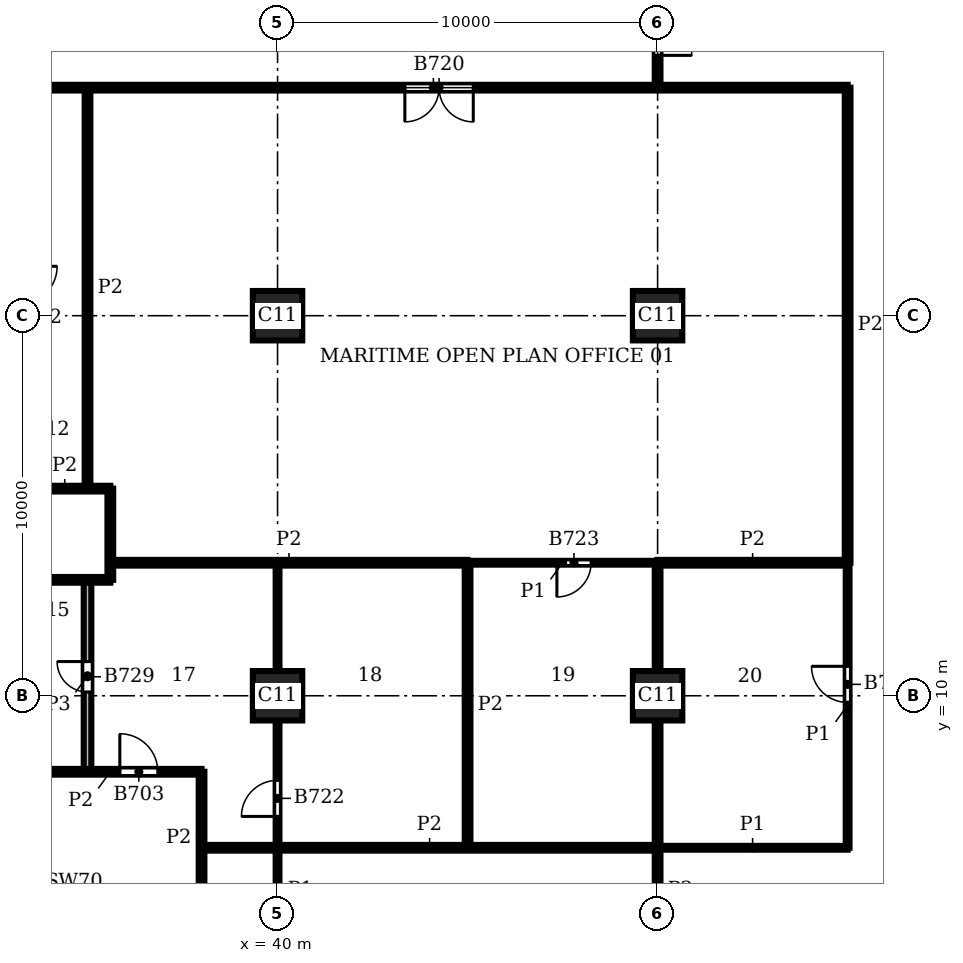
"""IFC4 building model, lengths in metres.
Left out: names, types, materials, properties, quantities, classifications, styles, units other than length and angle.
Written with IfcOpenShell. Run it as: python <this file> out.ifc"""

import sys

from ifc_helpers import new_model, si_unit, direction, frame, frame_2d, origin, origin_2d, place, context, subcontext, project, spatial, rectangle, extrude, element, fill, save


model = new_model("IFC4")
c1 = context("Model", 3, precision=1e-05, world=origin(), true_north=direction((0.0, 1.0)))
c2 = subcontext(c1, "Body", "Model", "MODEL_VIEW")
j1 = project(units=[si_unit("LENGTHUNIT", "METRE"), si_unit("PLANEANGLEUNIT", "RADIAN")], contexts=[c1])
p1 = place(None, origin())
s1 = spatial("IfcSite", under=j1, at=p1, CompositionType="ELEMENT")
p2 = place(p1, origin())
s2 = spatial("IfcBuilding", under=s1, at=p2, CompositionType="ELEMENT")
p3 = place(p2, frame((0.0, 0.0, 205.8)))
s3 = spatial("IfcBuildingStorey", under=s2, at=p3, CompositionType="ELEMENT", Elevation=205.8)
for number, where, z_axis, x_axis in (
    (1, (40.0, 10.0, 0.0), (0.0, 0.0, 1.0), (1.0, 0.0, 0.0)),
    (2, (40.0, 20.0, 0.0), (0.0, 0.0, 1.0), (1.0, 0.0, 0.0)),
    (3, (50.0, 10.0, 0.0), (0.0, 0.0, 1.0), (1.0, 0.0, 0.0)),
    (4, (50.0, 20.0, 0.0), (0.0, 0.0, 1.0), (1.0, 0.0, 0.0)),
):
    element("IfcColumn", number, at=place(p3, frame(where, z_axis=z_axis, x_axis=x_axis)), inside=s3, PredefinedType="COLUMN", context=c2, shape_type="SweptSolid", body=[
        extrude(rectangle(XDim=1.3, YDim=1.3, at=origin_2d()), origin(), (0.0, 0.0, 1.0), 3.9),
    ])
p4 = place(p3, frame((40.0, 0.45, 0.0), z_axis=(0.0, 0.0, 1.0), x_axis=(0.0, 1.0, 0.0)))
e5 = element("IfcWall", 5, at=p4, inside=s3, PredefinedType="PARTITIONING", context=c2, shape_type="SweptSolid", body=[
    extrude(rectangle(XDim=8.9, YDim=0.1, at=frame_2d((4.45, 0.0))), origin(), (0.0, 0.0, 1.0), 3.58),
])
p5 = place(p4, frame((6.375, 0.0, 0.0)))
e6 = element("IfcOpeningElement", 6, at=p5, cuts=e5, PredefinedType="OPENING", context=c2, shape_type="SweptSolid", body=[
    extrude(rectangle(XDim=0.95, YDim=2.1, at=frame_2d((0.475, 1.05))), frame((0.0, 0.06, 0.0), z_axis=(0.0, -1.0, 0.0), x_axis=(1.0, 0.0, 0.0)), (0.0, 0.0, 1.0), 0.12),
])
p6 = place(p4, frame((3.0, 0.0, 0.0)))
e7 = element("IfcOpeningElement", 7, at=p6, cuts=e5, PredefinedType="OPENING", context=c2, shape_type="SweptSolid", body=[
    extrude(rectangle(XDim=0.9, YDim=2.1, at=frame_2d((0.45, 1.05))), frame((0.0, 0.06, 0.0), z_axis=(0.0, -1.0, 0.0), x_axis=(1.0, 0.0, 0.0)), (0.0, 0.0, 1.0), 0.12),
])
p7 = place(p3, frame((40.0, 10.65, 0.0), z_axis=(0.0, 0.0, 1.0), x_axis=(0.0, 1.0, 0.0)))
e8 = element("IfcWall", 8, at=p7, inside=s3, PredefinedType="PARTITIONING", context=c2, shape_type="SweptSolid", body=[
    extrude(rectangle(XDim=2.85, YDim=0.1, at=frame_2d((1.425, 0.0))), origin(), (0.0, 0.0, 1.0), 3.58),
])
p8 = place(p3, frame((55.0, 6.0, 0.0), z_axis=(0.0, 0.0, 1.0), x_axis=(0.0, 1.0, 0.0)))
e9 = element("IfcWall", 9, at=p8, inside=s3, PredefinedType="PARTITIONING", context=c2, shape_type="SweptSolid", body=[
    extrude(rectangle(XDim=7.5, YDim=0.1, at=frame_2d((3.75, 0.0))), origin(), (0.0, 0.0, 1.0), 3.58),
])
p9 = place(p8, frame((3.825, 0.0, 0.0)))
e10 = element("IfcOpeningElement", 10, at=p9, cuts=e9, PredefinedType="OPENING", context=c2, shape_type="SweptSolid", body=[
    extrude(rectangle(XDim=0.95, YDim=2.1, at=frame_2d((0.475, 1.05))), frame((0.0, 0.06, 0.0), z_axis=(0.0, -1.0, 0.0), x_axis=(1.0, 0.0, 0.0)), (0.0, 0.0, 1.0), 0.12),
])
p10 = place(p3, frame((50.0, 6.0, 0.0), z_axis=(0.0, 0.0, 1.0), x_axis=(1.0, 0.0, 0.0)))
e11 = element("IfcWall", 11, at=p10, inside=s3, PredefinedType="PARTITIONING", context=c2, shape_type="SweptSolid", body=[
    extrude(rectangle(XDim=5.0, YDim=0.1, at=frame_2d((2.5, 0.0))), origin(), (0.0, 0.0, 1.0), 3.58),
])
p11 = place(p3, frame((45.0, 13.5, 0.0), z_axis=(0.0, 0.0, 1.0), x_axis=(1.0, 0.0, 0.0)))
e12 = element("IfcWall", 12, at=p11, inside=s3, PredefinedType="PARTITIONING", context=c2, shape_type="SweptSolid", body=[
    extrude(rectangle(XDim=5.0, YDim=0.1, at=frame_2d((2.5, 0.0))), origin(), (0.0, 0.0, 1.0), 3.58),
])
p12 = place(p11, frame((2.35, 0.0, 0.0)))
e13 = element("IfcOpeningElement", 13, at=p12, cuts=e12, PredefinedType="OPENING", context=c2, shape_type="SweptSolid", body=[
    extrude(rectangle(XDim=0.9, YDim=2.1, at=frame_2d((0.45, 1.05))), frame((0.0, 0.06, 0.0), z_axis=(0.0, -1.0, 0.0), x_axis=(1.0, 0.0, 0.0)), (0.0, 0.0, 1.0), 0.12),
])
p13 = place(p3, frame((35.0, 15.45, 0.0), z_axis=(0.0, 0.0, 1.0), x_axis=(0.0, 1.0, 0.0)))
e14 = element("IfcWall", 14, at=p13, inside=s3, PredefinedType="PARTITIONING", context=c2, shape_type="SweptSolid", body=[
    extrude(rectangle(XDim=10.55, YDim=0.15, at=frame_2d((5.275, 0.0))), origin(), (0.0, 0.0, 1.0), 3.58),
])
p14 = place(p3, frame((35.6, 13.05, 0.0), z_axis=(0.0, 0.0, 1.0), x_axis=(0.0, 1.0, 0.0)))
e15 = element("IfcWall", 15, at=p14, inside=s3, PredefinedType="PARTITIONING", context=c2, shape_type="SweptSolid", body=[
    extrude(rectangle(XDim=2.4, YDim=0.15, at=frame_2d((1.2, 0.0))), origin(), (0.0, 0.0, 1.0), 3.58),
])
p15 = place(p3, frame((38.0, 4.5, 0.0), z_axis=(0.0, 0.0, 1.0), x_axis=(0.0, 1.0, 0.0)))
e16 = element("IfcWall", 16, at=p15, inside=s3, PredefinedType="PARTITIONING", context=c2, shape_type="SweptSolid", body=[
    extrude(rectangle(XDim=3.5, YDim=0.15, at=frame_2d((1.75, 0.0))), origin(), (0.0, 0.0, 1.0), 3.58),
])
p16 = place(p3, frame((45.0, 6.0, 0.0), z_axis=(0.0, 0.0, 1.0), x_axis=(0.0, 1.0, 0.0)))
e17 = element("IfcWall", 17, at=p16, inside=s3, PredefinedType="PARTITIONING", context=c2, shape_type="SweptSolid", body=[
    extrude(rectangle(XDim=7.5, YDim=0.15, at=frame_2d((3.75, 0.0))), origin(), (0.0, 0.0, 1.0), 3.58),
])
p17 = place(p3, frame((50.0, 0.45, 0.0), z_axis=(0.0, 0.0, 1.0), x_axis=(0.0, 1.0, 0.0)))
e18 = element("IfcWall", 18, at=p17, inside=s3, PredefinedType="PARTITIONING", context=c2, shape_type="SweptSolid", body=[
    extrude(rectangle(XDim=8.9, YDim=0.15, at=frame_2d((4.45, 0.0))), origin(), (0.0, 0.0, 1.0), 3.58),
])
p18 = place(p3, frame((50.0, 10.65, 0.0), z_axis=(0.0, 0.0, 1.0), x_axis=(0.0, 1.0, 0.0)))
e19 = element("IfcWall", 19, at=p18, inside=s3, PredefinedType="PARTITIONING", context=c2, shape_type="SweptSolid", body=[
    extrude(rectangle(XDim=2.85, YDim=0.15, at=frame_2d((1.425, 0.0))), origin(), (0.0, 0.0, 1.0), 3.58),
])
p19 = place(p3, frame((50.0, 26.0, 0.0), z_axis=(0.0, 0.0, 1.0), x_axis=(0.0, 1.0, 0.0)))
e20 = element("IfcWall", 20, at=p19, inside=s3, PredefinedType="PARTITIONING", context=c2, shape_type="SweptSolid", body=[
    extrude(rectangle(XDim=3.55, YDim=0.15, at=frame_2d((1.775, 0.0))), origin(), (0.0, 0.0, 1.0), 3.58),
])
p20 = place(p19, frame((0.85, 0.0, 0.0)))
e21 = element("IfcOpeningElement", 21, at=p20, cuts=e20, PredefinedType="OPENING", context=c2, shape_type="SweptSolid", body=[
    extrude(rectangle(XDim=1.8, YDim=2.1, at=frame_2d((0.9, 1.05))), frame((0.0, 0.085, 0.0), z_axis=(0.0, -1.0, 0.0), x_axis=(1.0, 0.0, 0.0)), (0.0, 0.0, 1.0), 0.17),
])
p21 = place(p3, frame((55.0, 13.5, 0.0), z_axis=(0.0, 0.0, 1.0), x_axis=(0.0, 1.0, 0.0)))
e22 = element("IfcWall", 22, at=p21, inside=s3, PredefinedType="PARTITIONING", context=c2, shape_type="SweptSolid", body=[
    extrude(rectangle(XDim=12.5, YDim=0.15, at=frame_2d((6.25, 0.0))), origin(), (0.0, 0.0, 1.0), 3.58),
])
p22 = place(p3, frame((38.0, 6.0, 0.0), z_axis=(0.0, 0.0, 1.0), x_axis=(1.0, 0.0, 0.0)))
e23 = element("IfcWall", 23, at=p22, inside=s3, PredefinedType="PARTITIONING", context=c2, shape_type="SweptSolid", body=[
    extrude(rectangle(XDim=12.0, YDim=0.15, at=frame_2d((6.0, 0.0))), origin(), (0.0, 0.0, 1.0), 3.58),
])
p23 = place(p3, frame((33.2, 8.0, 0.0), z_axis=(0.0, 0.0, 1.0), x_axis=(1.0, 0.0, 0.0)))
e24 = element("IfcWall", 24, at=p23, inside=s3, PredefinedType="PARTITIONING", context=c2, shape_type="SweptSolid", body=[
    extrude(rectangle(XDim=4.8, YDim=0.15, at=frame_2d((2.4, 0.0))), origin(), (0.0, 0.0, 1.0), 3.58),
])
p24 = place(p23, frame((2.65, 0.0, 0.0)))
e25 = element("IfcOpeningElement", 25, at=p24, cuts=e24, PredefinedType="OPENING", context=c2, shape_type="SweptSolid", body=[
    extrude(rectangle(XDim=1.0, YDim=2.1, at=frame_2d((0.5, 1.05))), frame((0.0, 0.085, 0.0), z_axis=(0.0, -1.0, 0.0), x_axis=(1.0, 0.0, 0.0)), (0.0, 0.0, 1.0), 0.17),
])
p25 = place(p3, frame((33.2, 13.05, 0.0), z_axis=(0.0, 0.0, 1.0), x_axis=(1.0, 0.0, 0.0)))
e26 = element("IfcWall", 26, at=p25, inside=s3, PredefinedType="PARTITIONING", context=c2, shape_type="SweptSolid", body=[
    extrude(rectangle(XDim=2.4, YDim=0.15, at=frame_2d((1.2, 0.0))), origin(), (0.0, 0.0, 1.0), 3.58),
])
p26 = place(p3, frame((35.6, 13.5, 0.0), z_axis=(0.0, 0.0, 1.0), x_axis=(1.0, 0.0, 0.0)))
e27 = element("IfcWall", 27, at=p26, inside=s3, PredefinedType="PARTITIONING", context=c2, shape_type="SweptSolid", body=[
    extrude(rectangle(XDim=9.4, YDim=0.15, at=frame_2d((4.7, 0.0))), origin(), (0.0, 0.0, 1.0), 3.58),
])
p27 = place(p3, frame((50.0, 13.5, 0.0), z_axis=(0.0, 0.0, 1.0), x_axis=(1.0, 0.0, 0.0)))
e28 = element("IfcWall", 28, at=p27, inside=s3, PredefinedType="PARTITIONING", context=c2, shape_type="SweptSolid", body=[
    extrude(rectangle(XDim=5.0, YDim=0.15, at=frame_2d((2.5, 0.0))), origin(), (0.0, 0.0, 1.0), 3.58),
])
p28 = place(p3, frame((33.2, 15.45, 0.0), z_axis=(0.0, 0.0, 1.0), x_axis=(1.0, 0.0, 0.0)))
e29 = element("IfcWall", 29, at=p28, inside=s3, PredefinedType="PARTITIONING", context=c2, shape_type="SweptSolid", body=[
    extrude(rectangle(XDim=2.4, YDim=0.15, at=frame_2d((1.2, 0.0))), origin(), (0.0, 0.0, 1.0), 3.58),
])
p29 = place(p3, frame((33.2, 26.0, 0.0), z_axis=(0.0, 0.0, 1.0), x_axis=(1.0, 0.0, 0.0)))
e30 = element("IfcWall", 30, at=p29, inside=s3, PredefinedType="PARTITIONING", context=c2, shape_type="SweptSolid", body=[
    extrude(rectangle(XDim=21.8, YDim=0.15, at=frame_2d((10.9, 0.0))), origin(), (0.0, 0.0, 1.0), 3.58),
])
p30 = place(p29, frame((10.15, 0.0, 0.0)))
e31 = element("IfcOpeningElement", 31, at=p30, cuts=e30, PredefinedType="OPENING", context=c2, shape_type="SweptSolid", body=[
    extrude(rectangle(XDim=1.8, YDim=2.1, at=frame_2d((0.9, 1.05))), frame((0.0, 0.085, 0.0), z_axis=(0.0, -1.0, 0.0), x_axis=(1.0, 0.0, 0.0)), (0.0, 0.0, 1.0), 0.17),
])
p31 = place(p3, frame((35.0, 8.0, 0.0), z_axis=(0.0, 0.0, 1.0), x_axis=(0.0, 1.0, 0.0)))
e32 = element("IfcWall", 32, at=p31, inside=s3, PredefinedType="PARTITIONING", context=c2, shape_type="SweptSolid", body=[
    extrude(rectangle(XDim=5.05, YDim=0.2, at=frame_2d((2.525, 0.0))), origin(), (0.0, 0.0, 1.0), 3.58),
])
p32 = place(p31, frame((2.1, 0.0, 0.0)))
e33 = element("IfcOpeningElement", 33, at=p32, cuts=e32, PredefinedType="OPENING", context=c2, shape_type="SweptSolid", body=[
    extrude(rectangle(XDim=0.8, YDim=2.1, at=frame_2d((0.4, 1.05))), frame((0.0, 0.11, 0.0), z_axis=(0.0, -1.0, 0.0), x_axis=(1.0, 0.0, 0.0)), (0.0, 0.0, 1.0), 0.22),
])
p33 = place(p24, origin())
e34 = element("IfcDoor", 34, at=p33, inside=s3, OperationType="SINGLE_SWING_LEFT", PredefinedType="DOOR", context=c2, shape_type="SweptSolid", body=[
    extrude(rectangle(XDim=1.0, YDim=2.1, at=frame_2d((0.5, 1.05))), frame((0.0, 0.025, 0.0), z_axis=(0.0, -1.0, 0.0), x_axis=(1.0, 0.0, 0.0)), (0.0, 0.0, 1.0), 0.05),
])
fill(e25, e34)
p34 = place(p20, frame((1.8, 0.0, 0.0), z_axis=(0.0, 0.0, 1.0), x_axis=(-1.0, 0.0, 0.0)))
e35 = element("IfcDoor", 35, at=p34, inside=s3, OperationType="DOUBLE_DOOR_SINGLE_SWING", PredefinedType="DOOR", context=c2, shape_type="SweptSolid", body=[
    extrude(rectangle(XDim=1.8, YDim=2.1, at=frame_2d((0.9, 1.05))), frame((0.0, 0.025, 0.0), z_axis=(0.0, -1.0, 0.0), x_axis=(1.0, 0.0, 0.0)), (0.0, 0.0, 1.0), 0.05),
])
fill(e21, e35)
p35 = place(p30, frame((1.8, 0.0, 0.0), z_axis=(0.0, 0.0, 1.0), x_axis=(-1.0, 0.0, 0.0)))
e36 = element("IfcDoor", 36, at=p35, inside=s3, OperationType="DOUBLE_DOOR_SINGLE_SWING", PredefinedType="DOOR", context=c2, shape_type="SweptSolid", body=[
    extrude(rectangle(XDim=1.8, YDim=2.1, at=frame_2d((0.9, 1.05))), frame((0.0, 0.025, 0.0), z_axis=(0.0, -1.0, 0.0), x_axis=(1.0, 0.0, 0.0)), (0.0, 0.0, 1.0), 0.05),
])
fill(e31, e36)
p36 = place(p5, origin())
e37 = element("IfcDoor", 37, at=p36, inside=s3, OperationType="SINGLE_SWING_LEFT", PredefinedType="DOOR", context=c2, shape_type="SweptSolid", body=[
    extrude(rectangle(XDim=0.95, YDim=2.1, at=frame_2d((0.475, 1.05))), frame((0.0, 0.025, 0.0), z_axis=(0.0, -1.0, 0.0), x_axis=(1.0, 0.0, 0.0)), (0.0, 0.0, 1.0), 0.05),
])
fill(e6, e37)
p37 = place(p12, frame((0.9, 0.0, 0.0), z_axis=(0.0, 0.0, 1.0), x_axis=(-1.0, 0.0, 0.0)))
e38 = element("IfcDoor", 38, at=p37, inside=s3, OperationType="SINGLE_SWING_RIGHT", PredefinedType="DOOR", context=c2, shape_type="SweptSolid", body=[
    extrude(rectangle(XDim=0.9, YDim=2.1, at=frame_2d((0.45, 1.05))), frame((0.0, 0.025, 0.0), z_axis=(0.0, -1.0, 0.0), x_axis=(1.0, 0.0, 0.0)), (0.0, 0.0, 1.0), 0.05),
])
fill(e13, e38)
p38 = place(p9, origin())
e39 = element("IfcDoor", 39, at=p38, inside=s3, OperationType="SINGLE_SWING_RIGHT", PredefinedType="DOOR", context=c2, shape_type="SweptSolid", body=[
    extrude(rectangle(XDim=0.95, YDim=2.1, at=frame_2d((0.475, 1.05))), frame((0.0, 0.025, 0.0), z_axis=(0.0, -1.0, 0.0), x_axis=(1.0, 0.0, 0.0)), (0.0, 0.0, 1.0), 0.05),
])
fill(e10, e39)
p39 = place(p32, origin())
e40 = element("IfcDoor", 40, at=p39, inside=s3, OperationType="SINGLE_SWING_RIGHT", PredefinedType="DOOR", context=c2, shape_type="SweptSolid", body=[
    extrude(rectangle(XDim=0.8, YDim=2.1, at=frame_2d((0.4, 1.05))), frame((0.0, 0.025, 0.0), z_axis=(0.0, -1.0, 0.0), x_axis=(1.0, 0.0, 0.0)), (0.0, 0.0, 1.0), 0.05),
])
fill(e33, e40)
save(model, sys.argv[1])
